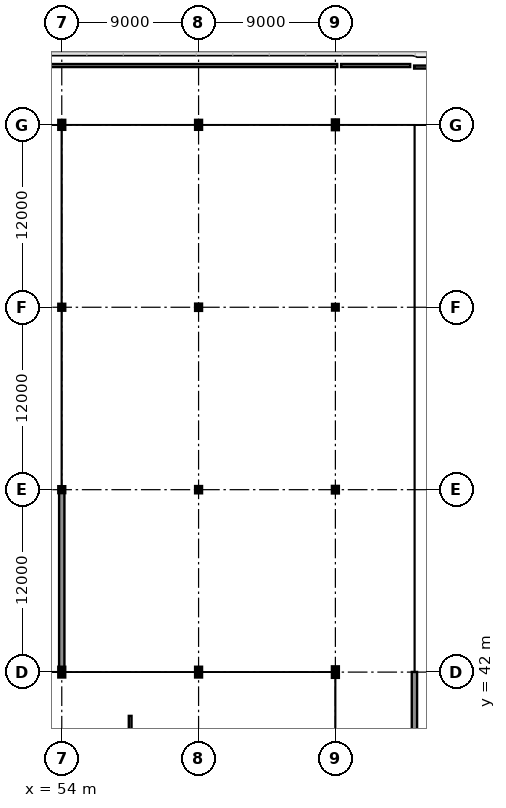
"""IFC4 building model, lengths in metres.
Left out: names, types, materials, properties, quantities, classifications, styles, units other than length and angle.
Written with IfcOpenShell. Run it as: python <this file> out.ifc"""

import sys

from ifc_helpers import new_model, si_unit, direction, frame, frame_2d, origin, origin_2d, place, context, subcontext, project, spatial, rectangle, i_section, extrude, element, fill, save


model = new_model("IFC4")
c1 = context("Model", 3, precision=1e-05, world=origin(), true_north=direction((0.0, 1.0)))
c2 = subcontext(c1, "Body", "Model", "MODEL_VIEW")
j1 = project(units=[si_unit("LENGTHUNIT", "METRE"), si_unit("PLANEANGLEUNIT", "RADIAN")], contexts=[c1])
p1 = place(None, origin())
s1 = spatial("IfcSite", under=j1, at=p1, CompositionType="ELEMENT")
p2 = place(p1, origin())
s2 = spatial("IfcBuilding", under=s1, at=p2, CompositionType="ELEMENT")
p3 = place(p2, origin())
s3 = spatial("IfcBuildingStorey", under=s2, at=p3, CompositionType="ELEMENT", Elevation=0.0)
p4 = place(p3, frame((54.0, 42.0, 0.0), z_axis=(0.0, 0.0, 1.0), x_axis=(1.0, 0.0, 0.0)))
e1 = element("IfcColumn", 1, at=p4, inside=s3, PredefinedType="COLUMN", context=c2, shape_type="SweptSolid", body=[
    extrude(i_section(OverallWidth=0.3, OverallDepth=0.55, WebThickness=0.015, FlangeThickness=0.029, at=origin_2d()), origin(), (0.0, 0.0, 1.0), 5.4),
])
for number, where, z_axis, x_axis in (
    (2, (54.0, 54.0, 0.0), (0.0, 0.0, 1.0), (0.0, 1.0, 0.0)),
    (3, (54.0, 66.0, 0.0), (0.0, 0.0, 1.0), (1.0, 0.0, 0.0)),
):
    element("IfcColumn", number, at=place(p3, frame(where, z_axis=z_axis, x_axis=x_axis)), inside=s3, PredefinedType="COLUMN", context=c2, shape_type="SweptSolid", body=[
        extrude(i_section(OverallWidth=0.3, OverallDepth=0.3, WebThickness=0.011, FlangeThickness=0.019, at=origin_2d()), origin(), (0.0, 0.0, 1.0), 5.4),
    ])
p5 = place(p3, frame((54.0, 78.0, 0.0), z_axis=(0.0, 0.0, 1.0), x_axis=(1.0, 0.0, 0.0)))
e4 = element("IfcColumn", 4, at=p5, inside=s3, PredefinedType="COLUMN", context=c2, shape_type="SweptSolid", body=[
    extrude(i_section(OverallWidth=0.3, OverallDepth=0.5, WebThickness=0.014, FlangeThickness=0.028, at=origin_2d()), origin(), (0.0, 0.0, 1.0), 5.4),
])
p6 = place(p3, frame((63.0, 42.0, 0.0), z_axis=(0.0, 0.0, 1.0), x_axis=(1.0, 0.0, 0.0)))
e5 = element("IfcColumn", 5, at=p6, inside=s3, PredefinedType="COLUMN", context=c2, shape_type="SweptSolid", body=[
    extrude(i_section(OverallWidth=0.3, OverallDepth=0.55, WebThickness=0.015, FlangeThickness=0.029, at=origin_2d()), origin(), (0.0, 0.0, 1.0), 5.4),
])
for number, where, z_axis, x_axis in (
    (6, (63.0, 54.0, 0.0), (0.0, 0.0, 1.0), (1.0, 0.0, 0.0)),
    (7, (63.0, 66.0, 0.0), (0.0, 0.0, 1.0), (1.0, 0.0, 0.0)),
):
    element("IfcColumn", number, at=place(p3, frame(where, z_axis=z_axis, x_axis=x_axis)), inside=s3, PredefinedType="COLUMN", context=c2, shape_type="SweptSolid", body=[
        extrude(i_section(OverallWidth=0.3, OverallDepth=0.32, WebThickness=0.011, FlangeThickness=0.021, at=origin_2d()), origin(), (0.0, 0.0, 1.0), 5.4),
    ])
p7 = place(p3, frame((63.0, 78.0, 0.0), z_axis=(0.0, 0.0, 1.0), x_axis=(0.0, 1.0, 0.0)))
e8 = element("IfcColumn", 8, at=p7, inside=s3, PredefinedType="COLUMN", context=c2, shape_type="SweptSolid", body=[
    extrude(i_section(OverallWidth=0.3, OverallDepth=0.5, WebThickness=0.014, FlangeThickness=0.028, at=origin_2d()), origin(), (0.0, 0.0, 1.0), 5.4),
])
p8 = place(p3, frame((72.0, 42.0, 0.0), z_axis=(0.0, 0.0, 1.0), x_axis=(0.0, 1.0, 0.0)))
e9 = element("IfcColumn", 9, at=p8, inside=s3, PredefinedType="COLUMN", context=c2, shape_type="SweptSolid", body=[
    extrude(i_section(OverallWidth=0.3, OverallDepth=0.6, WebThickness=0.015, FlangeThickness=0.03, at=origin_2d()), origin(), (0.0, 0.0, 1.0), 5.4),
])
p9 = place(p3, frame((72.0, 54.0, 0.0), z_axis=(0.0, 0.0, 1.0), x_axis=(1.0, 0.0, 0.0)))
e10 = element("IfcColumn", 10, at=p9, inside=s3, PredefinedType="COLUMN", context=c2, shape_type="SweptSolid", body=[
    extrude(i_section(OverallWidth=0.3, OverallDepth=0.34, WebThickness=0.012, FlangeThickness=0.021, at=origin_2d()), origin(), (0.0, 0.0, 1.0), 5.4),
])
p10 = place(p3, frame((72.0, 66.0, 0.0), z_axis=(0.0, 0.0, 1.0), x_axis=(1.0, 0.0, 0.0)))
e11 = element("IfcColumn", 11, at=p10, inside=s3, PredefinedType="COLUMN", context=c2, shape_type="SweptSolid", body=[
    extrude(i_section(OverallWidth=0.28, OverallDepth=0.28, WebThickness=0.01, FlangeThickness=0.018, at=origin_2d()), origin(), (0.0, 0.0, 1.0), 5.4),
])
p11 = place(p3, frame((72.0, 78.0, 0.0), z_axis=(0.0, 0.0, 1.0), x_axis=(1.0, 0.0, 0.0)))
e12 = element("IfcColumn", 12, at=p11, inside=s3, PredefinedType="COLUMN", context=c2, shape_type="SweptSolid", body=[
    extrude(i_section(OverallWidth=0.3, OverallDepth=0.55, WebThickness=0.015, FlangeThickness=0.029, at=origin_2d()), origin(), (0.0, 0.0, 1.0), 5.4),
])
p12 = place(p3, frame((77.2, 24.04, 0.0), z_axis=(0.0, 0.0, 1.0), x_axis=(0.0, 1.0, 0.0)))
e13 = element("IfcWall", 13, at=p12, inside=s3, PredefinedType="SOLIDWALL", context=c2, shape_type="SweptSolid", body=[
    extrude(rectangle(XDim=17.97, YDim=0.35, at=frame_2d((8.985, 0.0))), origin(), (0.0, 0.0, 1.0), 5.08),
])
p13 = place(p12, frame((12.66, 0.0, 0.0)))
e14 = element("IfcOpeningElement", 14, at=p13, cuts=e13, PredefinedType="OPENING", context=c2, shape_type="SweptSolid", body=[
    extrude(rectangle(XDim=1.8, YDim=2.4, at=frame_2d((0.9, 1.2))), frame((0.0, 0.19, 0.0), z_axis=(0.0, -1.0, 0.0), x_axis=(1.0, 0.0, 0.0)), (0.0, 0.0, 1.0), 0.38),
])
p14 = place(p3, frame((54.0, 53.992, 0.0), z_axis=(0.0, 0.0, 1.0), x_axis=(0.0, -1.0, 0.0)))
e15 = element("IfcWall", 15, at=p14, inside=s3, PredefinedType="SOLIDWALL", context=c2, shape_type="SweptSolid", body=[
    extrude(rectangle(XDim=11.719, YDim=0.35, at=frame_2d((5.859, 0.0))), origin(), (0.0, 0.0, 1.0), 4.725),
])
p15 = place(p14, frame((4.892, 0.0, 0.0)))
e16 = element("IfcOpeningElement", 16, at=p15, cuts=e15, PredefinedType="OPENING", context=c2, shape_type="SweptSolid", body=[
    extrude(rectangle(XDim=2.2, YDim=2.7, at=frame_2d((1.1, 1.35))), frame((0.0, 0.19, 0.0), z_axis=(0.0, -1.0, 0.0), x_axis=(1.0, 0.0, 0.0)), (0.0, 0.0, 1.0), 0.38),
])
p16 = place(p3, frame((58.5, 36.08, 0.0), z_axis=(0.0, 0.0, 1.0), x_axis=(0.0, 1.0, 0.0)))
e17 = element("IfcWall", 17, at=p16, inside=s3, PredefinedType="PARTITIONING", context=c2, shape_type="SweptSolid", body=[
    extrude(rectangle(XDim=3.04, YDim=0.18, at=frame_2d((1.52, 0.0))), origin(), (0.0, 0.0, 1.0), 5.04),
])
p17 = place(p16, frame((0.795, 0.0, 0.0)))
e18 = element("IfcOpeningElement", 18, at=p17, cuts=e17, PredefinedType="OPENING", context=c2, shape_type="SweptSolid", body=[
    extrude(rectangle(XDim=1.45, YDim=2.2, at=frame_2d((0.725, 1.1))), frame((0.0, 0.105, 0.0), z_axis=(0.0, -1.0, 0.0), x_axis=(1.0, 0.0, 0.0)), (0.0, 0.0, 1.0), 0.21),
])
p18 = place(p3, frame((76.92, 81.9, 0.0), z_axis=(0.0, 0.0, 1.0), x_axis=(-1.0, 0.0, 0.0)))
e19 = element("IfcWall", 19, at=p18, inside=s3, PredefinedType="PARTITIONING", context=c2, shape_type="SweptSolid", body=[
    extrude(rectangle(XDim=4.54, YDim=0.2, at=frame_2d((2.27, 0.0))), origin(), (0.0, 0.0, 1.0), 5.04),
])
p19 = place(p3, frame((72.12, 81.9, 0.0), z_axis=(0.0, 0.0, 1.0), x_axis=(-1.0, 0.0, 0.0)))
e20 = element("IfcWall", 20, at=p19, inside=s3, PredefinedType="PARTITIONING", context=c2, shape_type="SweptSolid", body=[
    extrude(rectangle(XDim=36.54, YDim=0.2, at=frame_2d((18.27, 0.0))), origin(), (0.0, 0.0, 1.0), 5.04),
])
p20 = place(p19, frame((17.32, 0.0, 0.0)))
e21 = element("IfcOpeningElement", 21, at=p20, cuts=e20, PredefinedType="OPENING", context=c2, shape_type="SweptSolid", body=[
    extrude(rectangle(XDim=1.9, YDim=2.5, at=frame_2d((0.95, 1.25))), frame((0.0, 0.115, 0.0), z_axis=(0.0, -1.0, 0.0), x_axis=(1.0, 0.0, 0.0)), (0.0, 0.0, 1.0), 0.23),
])
p21 = place(p19, frame((34.19, 0.0, 1.05)))
e22 = element("IfcOpeningElement", 22, at=p21, cuts=e20, PredefinedType="OPENING", context=c2, shape_type="SweptSolid", body=[
    extrude(rectangle(XDim=1.5, YDim=1.1, at=frame_2d((0.75, 0.55))), frame((0.0, 0.115, 0.0), z_axis=(0.0, -1.0, 0.0), x_axis=(1.0, 0.0, 0.0)), (0.0, 0.0, 1.0), 0.23),
])
p22 = place(p3, frame((80.875, 81.8, 0.0), z_axis=(0.0, 0.0, 1.0), x_axis=(-1.0, 0.0, 0.0)))
e23 = element("IfcWall", 23, at=p22, inside=s3, PredefinedType="PARTITIONING", context=c2, shape_type="SweptSolid", body=[
    extrude(rectangle(XDim=3.695, YDim=0.2, at=frame_2d((1.848, 0.0))), origin(), (0.0, 0.0, 1.0), 5.04),
])
p23 = place(p13, frame((1.8, 0.0, 0.0), z_axis=(0.0, 0.0, 1.0), x_axis=(-1.0, 0.0, 0.0)))
e24 = element("IfcDoor", 24, at=p23, inside=s3, OperationType="DOUBLE_DOOR_SINGLE_SWING", PredefinedType="DOOR", context=c2, shape_type="SweptSolid", body=[
    extrude(rectangle(XDim=1.8, YDim=2.4, at=frame_2d((0.9, 1.2))), frame((0.0, 0.025, 0.0), z_axis=(0.0, -1.0, 0.0), x_axis=(1.0, 0.0, 0.0)), (0.0, 0.0, 1.0), 0.05),
])
fill(e14, e24)
p24 = place(p15, frame((2.2, 0.0, 0.0), z_axis=(0.0, 0.0, 1.0), x_axis=(-1.0, 0.0, 0.0)))
e25 = element("IfcDoor", 25, at=p24, inside=s3, OperationType="DOUBLE_DOOR_SINGLE_SWING", PredefinedType="DOOR", context=c2, shape_type="SweptSolid", body=[
    extrude(rectangle(XDim=2.2, YDim=2.7, at=frame_2d((1.1, 1.35))), frame((0.0, 0.025, 0.0), z_axis=(0.0, -1.0, 0.0), x_axis=(1.0, 0.0, 0.0)), (0.0, 0.0, 1.0), 0.05),
])
fill(e16, e25)
p25 = place(p17, origin())
e26 = element("IfcDoor", 26, at=p25, inside=s3, OperationType="DOUBLE_DOOR_SINGLE_SWING", PredefinedType="DOOR", context=c2, shape_type="SweptSolid", body=[
    extrude(rectangle(XDim=1.45, YDim=2.2, at=frame_2d((0.725, 1.1))), frame((0.0, 0.025, 0.0), z_axis=(0.0, -1.0, 0.0), x_axis=(1.0, 0.0, 0.0)), (0.0, 0.0, 1.0), 0.05),
])
fill(e18, e26)
p26 = place(p20, origin())
e27 = element("IfcDoor", 27, at=p26, inside=s3, OperationType="DOUBLE_DOOR_SINGLE_SWING", PredefinedType="DOOR", context=c2, shape_type="SweptSolid", body=[
    extrude(rectangle(XDim=1.9, YDim=2.5, at=frame_2d((0.95, 1.25))), frame((0.0, 0.025, 0.0), z_axis=(0.0, -1.0, 0.0), x_axis=(1.0, 0.0, 0.0)), (0.0, 0.0, 1.0), 0.05),
])
fill(e21, e27)
save(model, sys.argv[1])
